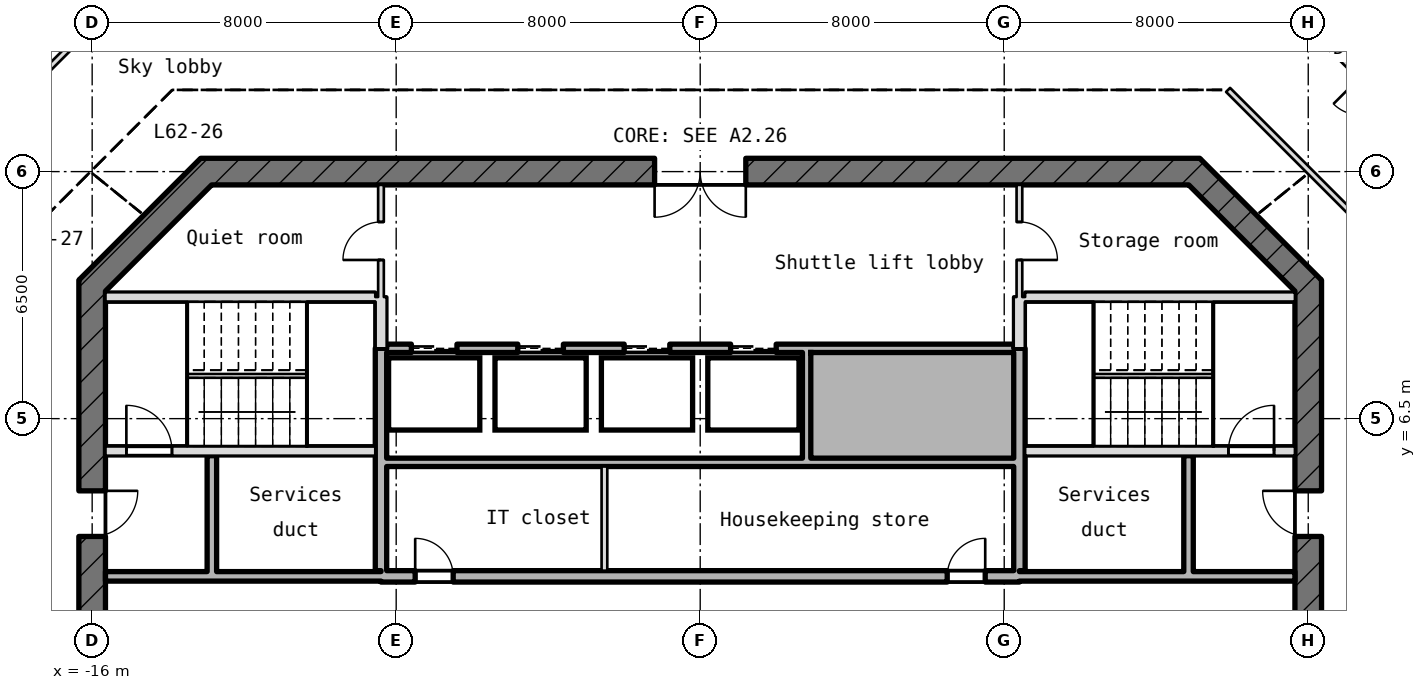
"""IFC4 building model, lengths in metres.
Left out: names, types, materials, properties, quantities, classifications, styles, units other than length and angle.
Written with IfcOpenShell. Run it as: python <this file> out.ifc"""

import sys

from ifc_helpers import new_model, si_unit, direction, frame, frame_2d, origin, place, context, subcontext, project, spatial, rectangle, extrude, element, fill, save


model = new_model("IFC4")
c1 = context("Model", 3, precision=1e-05, world=origin(), true_north=direction((0.0, 1.0)))
c2 = subcontext(c1, "Body", "Model", "MODEL_VIEW")
j1 = project(units=[si_unit("LENGTHUNIT", "METRE"), si_unit("PLANEANGLEUNIT", "RADIAN")], contexts=[c1])
p1 = place(None, origin())
s1 = spatial("IfcSite", under=j1, at=p1, CompositionType="ELEMENT")
p2 = place(p1, origin())
s2 = spatial("IfcBuilding", under=s1, at=p2, CompositionType="ELEMENT")
p3 = place(p2, frame((0.0, 0.0, 279.1)))
s3 = spatial("IfcBuildingStorey", under=s2, at=p3, CompositionType="ELEMENT", Elevation=279.1)
p4 = place(p3, frame((16.0, -10.145, -0.25), z_axis=(0.0, 0.0, 1.0), x_axis=(0.0, 1.0, 0.0)))
e1 = element("IfcWall", 1, at=p4, inside=s3, PredefinedType="SHEAR", context=c2, shape_type="SweptSolid", body=[
    extrude(rectangle(XDim=20.29, YDim=0.7, at=frame_2d((10.145, 0.0))), origin(), (0.0, 0.0, 1.0), 5.47),
])
p5 = place(p4, frame((8.945, 0.0, 0.25)))
e2 = element("IfcOpeningElement", 2, at=p5, cuts=e1, PredefinedType="OPENING", context=c2, shape_type="SweptSolid", body=[
    extrude(rectangle(XDim=2.4, YDim=2.1, at=frame_2d((1.2, 1.05))), frame((0.0, 0.36, 0.0), z_axis=(0.0, -1.0, 0.0), x_axis=(1.0, 0.0, 0.0)), (0.0, 0.0, 1.0), 0.72),
])
p6 = place(p4, frame((13.545, 0.0, 0.25)))
e3 = element("IfcOpeningElement", 3, at=p6, cuts=e1, PredefinedType="OPENING", context=c2, shape_type="SweptSolid", body=[
    extrude(rectangle(XDim=1.2, YDim=2.1, at=frame_2d((0.6, 1.05))), frame((0.0, 0.36, 0.0), z_axis=(0.0, -1.0, 0.0), x_axis=(1.0, 0.0, 0.0)), (0.0, 0.0, 1.0), 0.72),
])
p7 = place(p4, frame((4.745, 0.0, 0.25)))
e4 = element("IfcOpeningElement", 4, at=p7, cuts=e1, PredefinedType="OPENING", context=c2, shape_type="SweptSolid", body=[
    extrude(rectangle(XDim=1.2, YDim=2.1, at=frame_2d((0.6, 1.05))), frame((0.0, 0.36, 0.0), z_axis=(0.0, -1.0, 0.0), x_axis=(1.0, 0.0, 0.0)), (0.0, 0.0, 1.0), 0.72),
])
p8 = place(p3, frame((16.103, 9.897, -0.25), z_axis=(0.0, 0.0, 1.0), x_axis=(-0.707106781187, 0.707106781187, 0.0)))
e5 = element("IfcWall", 5, at=p8, inside=s3, PredefinedType="SHEAR", context=c2, shape_type="SweptSolid", body=[
    extrude(rectangle(XDim=4.533, YDim=0.7, at=frame_2d((2.266, 0.0))), origin(), (0.0, 0.0, 1.0), 5.47),
])
p9 = place(p3, frame((13.145, 13.0, -0.25), z_axis=(0.0, 0.0, 1.0), x_axis=(-1.0, 0.0, 0.0)))
e6 = element("IfcWall", 6, at=p9, inside=s3, PredefinedType="SHEAR", context=c2, shape_type="SweptSolid", body=[
    extrude(rectangle(XDim=26.29, YDim=0.7, at=frame_2d((13.145, 0.0))), origin(), (0.0, 0.0, 1.0), 5.47),
])
p10 = place(p9, frame((11.945, 0.0, 0.25)))
e7 = element("IfcOpeningElement", 7, at=p10, cuts=e6, PredefinedType="OPENING", context=c2, shape_type="SweptSolid", body=[
    extrude(rectangle(XDim=2.4, YDim=2.1, at=frame_2d((1.2, 1.05))), frame((0.0, 0.36, 0.0), z_axis=(0.0, -1.0, 0.0), x_axis=(1.0, 0.0, 0.0)), (0.0, 0.0, 1.0), 0.72),
])
p11 = place(p3, frame((-12.897, 13.103, -0.25), z_axis=(0.0, 0.0, 1.0), x_axis=(-0.707106781187, -0.707106781187, 0.0)))
e8 = element("IfcWall", 8, at=p11, inside=s3, PredefinedType="SHEAR", context=c2, shape_type="SweptSolid", body=[
    extrude(rectangle(XDim=4.533, YDim=0.7, at=frame_2d((2.266, 0.0))), origin(), (0.0, 0.0, 1.0), 5.47),
])
p12 = place(p3, frame((-16.0, 10.145, -0.25), z_axis=(0.0, 0.0, 1.0), x_axis=(0.0, -1.0, 0.0)))
e9 = element("IfcWall", 9, at=p12, inside=s3, PredefinedType="SHEAR", context=c2, shape_type="SweptSolid", body=[
    extrude(rectangle(XDim=20.29, YDim=0.7, at=frame_2d((10.145, 0.0))), origin(), (0.0, 0.0, 1.0), 5.47),
])
p13 = place(p12, frame((8.945, 0.0, 0.25)))
e10 = element("IfcOpeningElement", 10, at=p13, cuts=e9, PredefinedType="OPENING", context=c2, shape_type="SweptSolid", body=[
    extrude(rectangle(XDim=2.4, YDim=2.1, at=frame_2d((1.2, 1.05))), frame((0.0, 0.36, 0.0), z_axis=(0.0, -1.0, 0.0), x_axis=(1.0, 0.0, 0.0)), (0.0, 0.0, 1.0), 0.72),
])
p14 = place(p12, frame((5.545, 0.0, 0.25)))
e11 = element("IfcOpeningElement", 11, at=p14, cuts=e9, PredefinedType="OPENING", context=c2, shape_type="SweptSolid", body=[
    extrude(rectangle(XDim=1.2, YDim=2.1, at=frame_2d((0.6, 1.05))), frame((0.0, 0.36, 0.0), z_axis=(0.0, -1.0, 0.0), x_axis=(1.0, 0.0, 0.0)), (0.0, 0.0, 1.0), 0.72),
])
p15 = place(p3, frame((-15.65, 2.35, 0.0), z_axis=(0.0, 0.0, 1.0), x_axis=(1.0, 0.0, 0.0)))
e12 = element("IfcWall", 12, at=p15, inside=s3, PredefinedType="STANDARD", context=c2, shape_type="SweptSolid", body=[
    extrude(rectangle(XDim=7.25, YDim=0.25, at=frame_2d((3.625, 0.0))), origin(), (0.0, 0.0, 1.0), 5.22),
])
p16 = place(p3, frame((-8.4, 2.35, -0.25), z_axis=(0.0, 0.0, 1.0), x_axis=(1.0, 0.0, 0.0)))
e13 = element("IfcWall", 13, at=p16, inside=s3, PredefinedType="SHEAR", context=c2, shape_type="SweptSolid", body=[
    extrude(rectangle(XDim=16.8, YDim=0.3, at=frame_2d((8.4, 0.0))), origin(), (0.0, 0.0, 1.0), 5.47),
])
p17 = place(p16, frame((0.9, 0.0, 0.25)))
e14 = element("IfcOpeningElement", 14, at=p17, cuts=e13, PredefinedType="OPENING", context=c2, shape_type="SweptSolid", body=[
    extrude(rectangle(XDim=1.0, YDim=2.1, at=frame_2d((0.5, 1.05))), frame((0.0, 0.16, 0.0), z_axis=(0.0, -1.0, 0.0), x_axis=(1.0, 0.0, 0.0)), (0.0, 0.0, 1.0), 0.32),
])
p18 = place(p16, frame((14.9, 0.0, 0.25)))
e15 = element("IfcOpeningElement", 15, at=p18, cuts=e13, PredefinedType="OPENING", context=c2, shape_type="SweptSolid", body=[
    extrude(rectangle(XDim=1.0, YDim=2.1, at=frame_2d((0.5, 1.05))), frame((0.0, 0.16, 0.0), z_axis=(0.0, -1.0, 0.0), x_axis=(1.0, 0.0, 0.0)), (0.0, 0.0, 1.0), 0.32),
])
p19 = place(p3, frame((8.4, 2.35, 0.0), z_axis=(0.0, 0.0, 1.0), x_axis=(1.0, 0.0, 0.0)))
e16 = element("IfcWall", 16, at=p19, inside=s3, PredefinedType="STANDARD", context=c2, shape_type="SweptSolid", body=[
    extrude(rectangle(XDim=7.25, YDim=0.25, at=frame_2d((3.625, 0.0))), origin(), (0.0, 0.0, 1.0), 5.22),
])
p20 = place(p3, frame((-8.25, 5.35, 0.0), z_axis=(0.0, 0.0, 1.0), x_axis=(1.0, 0.0, 0.0)))
e17 = element("IfcWall", 17, at=p20, inside=s3, PredefinedType="STANDARD", context=c2, shape_type="SweptSolid", body=[
    extrude(rectangle(XDim=16.5, YDim=0.22, at=frame_2d((8.25, 0.0))), origin(), (0.0, 0.0, 1.0), 5.22),
])
p21 = place(p3, frame((-15.65, 5.65, -0.25), z_axis=(0.0, 0.0, 1.0), x_axis=(1.0, 0.0, 0.0)))
e18 = element("IfcWall", 18, at=p21, inside=s3, PredefinedType="SHEAR", context=c2, shape_type="SweptSolid", body=[
    extrude(rectangle(XDim=7.1, YDim=0.25, at=frame_2d((3.55, 0.0))), origin(), (0.0, 0.0, 1.0), 5.47),
])
p22 = place(p21, frame((0.55, 0.0, 0.25)))
e19 = element("IfcOpeningElement", 19, at=p22, cuts=e18, PredefinedType="OPENING", context=c2, shape_type="SweptSolid", body=[
    extrude(rectangle(XDim=1.2, YDim=2.1, at=frame_2d((0.6, 1.05))), frame((0.0, 0.135, 0.0), z_axis=(0.0, -1.0, 0.0), x_axis=(1.0, 0.0, 0.0)), (0.0, 0.0, 1.0), 0.27),
])
p23 = place(p3, frame((8.55, 5.65, -0.25), z_axis=(0.0, 0.0, 1.0), x_axis=(1.0, 0.0, 0.0)))
e20 = element("IfcWall", 20, at=p23, inside=s3, PredefinedType="SHEAR", context=c2, shape_type="SweptSolid", body=[
    extrude(rectangle(XDim=7.1, YDim=0.25, at=frame_2d((3.55, 0.0))), origin(), (0.0, 0.0, 1.0), 5.47),
])
p24 = place(p23, frame((5.35, 0.0, 0.25)))
e21 = element("IfcOpeningElement", 21, at=p24, cuts=e20, PredefinedType="OPENING", context=c2, shape_type="SweptSolid", body=[
    extrude(rectangle(XDim=1.2, YDim=2.1, at=frame_2d((0.6, 1.05))), frame((0.0, 0.135, 0.0), z_axis=(0.0, -1.0, 0.0), x_axis=(1.0, 0.0, 0.0)), (0.0, 0.0, 1.0), 0.27),
])
p25 = place(p3, frame((-8.25, 8.35, 0.0), z_axis=(0.0, 0.0, 1.0), x_axis=(1.0, 0.0, 0.0)))
e22 = element("IfcWall", 22, at=p25, inside=s3, PredefinedType="STANDARD", context=c2, shape_type="SweptSolid", body=[
    extrude(rectangle(XDim=16.5, YDim=0.22, at=frame_2d((8.25, 0.0))), origin(), (0.0, 0.0, 1.0), 5.22),
])
p26 = place(p25, frame((0.65, 0.0, 0.0)))
e23 = element("IfcOpeningElement", 23, at=p26, cuts=e22, PredefinedType="OPENING", context=c2, shape_type="SweptSolid", body=[
    extrude(rectangle(XDim=1.2, YDim=2.1, at=frame_2d((0.6, 1.05))), frame((0.0, 0.12, 0.0), z_axis=(0.0, -1.0, 0.0), x_axis=(1.0, 0.0, 0.0)), (0.0, 0.0, 1.0), 0.24),
])
p27 = place(p25, frame((3.45, 0.0, 0.0)))
e24 = element("IfcOpeningElement", 24, at=p27, cuts=e22, PredefinedType="OPENING", context=c2, shape_type="SweptSolid", body=[
    extrude(rectangle(XDim=1.2, YDim=2.1, at=frame_2d((0.6, 1.05))), frame((0.0, 0.12, 0.0), z_axis=(0.0, -1.0, 0.0), x_axis=(1.0, 0.0, 0.0)), (0.0, 0.0, 1.0), 0.24),
])
p28 = place(p25, frame((6.25, 0.0, 0.0)))
e25 = element("IfcOpeningElement", 25, at=p28, cuts=e22, PredefinedType="OPENING", context=c2, shape_type="SweptSolid", body=[
    extrude(rectangle(XDim=1.2, YDim=2.1, at=frame_2d((0.6, 1.05))), frame((0.0, 0.12, 0.0), z_axis=(0.0, -1.0, 0.0), x_axis=(1.0, 0.0, 0.0)), (0.0, 0.0, 1.0), 0.24),
])
p29 = place(p25, frame((9.05, 0.0, 0.0)))
e26 = element("IfcOpeningElement", 26, at=p29, cuts=e22, PredefinedType="OPENING", context=c2, shape_type="SweptSolid", body=[
    extrude(rectangle(XDim=1.2, YDim=2.1, at=frame_2d((0.6, 1.05))), frame((0.0, 0.12, 0.0), z_axis=(0.0, -1.0, 0.0), x_axis=(1.0, 0.0, 0.0)), (0.0, 0.0, 1.0), 0.24),
])
for number, where, z_axis, x_axis in (
    (27, (-15.65, 9.7, -0.25), (0.0, 0.0, 1.0), (1.0, 0.0, 0.0)),
    (28, (8.55, 9.7, -0.25), (0.0, 0.0, 1.0), (1.0, 0.0, 0.0)),
):
    element("IfcWall", number, at=place(p3, frame(where, z_axis=z_axis, x_axis=x_axis)), inside=s3, PredefinedType="SHEAR", context=c2, shape_type="SweptSolid", body=[
        extrude(rectangle(XDim=7.1, YDim=0.25, at=frame_2d((3.55, 0.0))), origin(), (0.0, 0.0, 1.0), 5.47),
    ])
p30 = place(p3, frame((-12.85, 2.475, 0.0), z_axis=(0.0, 0.0, 1.0), x_axis=(0.0, 1.0, 0.0)))
e29 = element("IfcWall", 29, at=p30, inside=s3, PredefinedType="STANDARD", context=c2, shape_type="SweptSolid", body=[
    extrude(rectangle(XDim=3.05, YDim=0.25, at=frame_2d((1.525, 0.0))), origin(), (0.0, 0.0, 1.0), 5.22),
])
p31 = place(p3, frame((-8.4, 2.5, -0.25), z_axis=(0.0, 0.0, 1.0), x_axis=(0.0, 1.0, 0.0)))
e30 = element("IfcWall", 30, at=p31, inside=s3, PredefinedType="SHEAR", context=c2, shape_type="SweptSolid", body=[
    extrude(rectangle(XDim=5.85, YDim=0.3, at=frame_2d((2.925, 0.0))), origin(), (0.0, 0.0, 1.0), 5.47),
])
p32 = place(p3, frame((-8.4, 8.35, -0.25), z_axis=(0.0, 0.0, 1.0), x_axis=(0.0, 1.0, 0.0)))
e31 = element("IfcWall", 31, at=p32, inside=s3, PredefinedType="SHEAR", context=c2, shape_type="SweptSolid", body=[
    extrude(rectangle(XDim=1.35, YDim=0.3, at=frame_2d((0.675, 0.0))), origin(), (0.0, 0.0, 1.0), 5.47),
])
p33 = place(p3, frame((-8.4, 9.7, 0.0), z_axis=(0.0, 0.0, 1.0), x_axis=(0.0, 1.0, 0.0)))
e32 = element("IfcWall", 32, at=p33, inside=s3, PredefinedType="PARTITIONING", context=c2, shape_type="SweptSolid", body=[
    extrude(rectangle(XDim=2.95, YDim=0.15, at=frame_2d((1.475, 0.0))), origin(), (0.0, 0.0, 1.0), 5.22),
])
p34 = place(p33, frame((0.975, 0.0, 0.0)))
e33 = element("IfcOpeningElement", 33, at=p34, cuts=e32, PredefinedType="OPENING", context=c2, shape_type="SweptSolid", body=[
    extrude(rectangle(XDim=1.0, YDim=2.1, at=frame_2d((0.5, 1.05))), frame((0.0, 0.085, 0.0), z_axis=(0.0, -1.0, 0.0), x_axis=(1.0, 0.0, 0.0)), (0.0, 0.0, 1.0), 0.17),
])
p35 = place(p3, frame((-2.52, 2.5, 0.0), z_axis=(0.0, 0.0, 1.0), x_axis=(0.0, 1.0, 0.0)))
e34 = element("IfcWall", 34, at=p35, inside=s3, PredefinedType="PARTITIONING", context=c2, shape_type="SweptSolid", body=[
    extrude(rectangle(XDim=2.74, YDim=0.15, at=frame_2d((1.37, 0.0))), origin(), (0.0, 0.0, 1.0), 5.22),
])
p36 = place(p3, frame((2.8, 5.46, 0.0), z_axis=(0.0, 0.0, 1.0), x_axis=(0.0, 1.0, 0.0)))
e35 = element("IfcWall", 35, at=p36, inside=s3, PredefinedType="STANDARD", context=c2, shape_type="SweptSolid", body=[
    extrude(rectangle(XDim=2.78, YDim=0.22, at=frame_2d((1.39, 0.0))), origin(), (0.0, 0.0, 1.0), 5.22),
])
p37 = place(p3, frame((8.4, 2.5, -0.25), z_axis=(0.0, 0.0, 1.0), x_axis=(0.0, 1.0, 0.0)))
e36 = element("IfcWall", 36, at=p37, inside=s3, PredefinedType="SHEAR", context=c2, shape_type="SweptSolid", body=[
    extrude(rectangle(XDim=5.85, YDim=0.3, at=frame_2d((2.925, 0.0))), origin(), (0.0, 0.0, 1.0), 5.47),
])
p38 = place(p3, frame((8.4, 8.35, -0.25), z_axis=(0.0, 0.0, 1.0), x_axis=(0.0, 1.0, 0.0)))
e37 = element("IfcWall", 37, at=p38, inside=s3, PredefinedType="SHEAR", context=c2, shape_type="SweptSolid", body=[
    extrude(rectangle(XDim=1.35, YDim=0.3, at=frame_2d((0.675, 0.0))), origin(), (0.0, 0.0, 1.0), 5.47),
])
p39 = place(p3, frame((8.4, 9.7, 0.0), z_axis=(0.0, 0.0, 1.0), x_axis=(0.0, 1.0, 0.0)))
e38 = element("IfcWall", 38, at=p39, inside=s3, PredefinedType="PARTITIONING", context=c2, shape_type="SweptSolid", body=[
    extrude(rectangle(XDim=2.95, YDim=0.15, at=frame_2d((1.475, 0.0))), origin(), (0.0, 0.0, 1.0), 5.22),
])
p40 = place(p39, frame((0.975, 0.0, 0.0)))
e39 = element("IfcOpeningElement", 39, at=p40, cuts=e38, PredefinedType="OPENING", context=c2, shape_type="SweptSolid", body=[
    extrude(rectangle(XDim=1.0, YDim=2.1, at=frame_2d((0.5, 1.05))), frame((0.0, 0.085, 0.0), z_axis=(0.0, -1.0, 0.0), x_axis=(1.0, 0.0, 0.0)), (0.0, 0.0, 1.0), 0.17),
])
p41 = place(p3, frame((12.85, 2.475, 0.0), z_axis=(0.0, 0.0, 1.0), x_axis=(0.0, 1.0, 0.0)))
e40 = element("IfcWall", 40, at=p41, inside=s3, PredefinedType="STANDARD", context=c2, shape_type="SweptSolid", body=[
    extrude(rectangle(XDim=3.05, YDim=0.25, at=frame_2d((1.525, 0.0))), origin(), (0.0, 0.0, 1.0), 5.22),
])
p42 = place(p3, frame((-20.659, 12.2, 0.0), z_axis=(0.0, 0.0, 1.0), x_axis=(0.707091504448, 0.707122057596, 0.0)))
e41 = element("IfcWall", 41, at=p42, inside=s3, PredefinedType="PARTITIONING", context=c2, shape_type="SweptSolid", body=[
    extrude(rectangle(XDim=7.991, YDim=0.15, at=frame_2d((3.995, 0.0))), origin(), (0.0, 0.0, 1.0), 5.22),
])
p43 = place(p42, frame((1.67, 0.0, 0.0)))
e42 = element("IfcOpeningElement", 42, at=p43, cuts=e41, PredefinedType="OPENING", context=c2, shape_type="SweptSolid", body=[
    extrude(rectangle(XDim=1.0, YDim=2.1, at=frame_2d((0.5, 1.05))), frame((0.0, 0.085, 0.0), z_axis=(0.0, -1.0, 0.0), x_axis=(1.0, 0.0, 0.0)), (0.0, 0.0, 1.0), 0.17),
])
p44 = place(p3, frame((20.439, 12.42, 0.0), z_axis=(0.0, 0.0, 1.0), x_axis=(-0.707106781187, 0.707106781187, 0.0)))
e43 = element("IfcWall", 43, at=p44, inside=s3, PredefinedType="PARTITIONING", context=c2, shape_type="SweptSolid", body=[
    extrude(rectangle(XDim=7.68, YDim=0.15, at=frame_2d((3.84, 0.0))), origin(), (0.0, 0.0, 1.0), 5.22),
])
p45 = place(p44, frame((3.34, 0.0, 0.0)))
e44 = element("IfcOpeningElement", 44, at=p45, cuts=e43, PredefinedType="OPENING", context=c2, shape_type="SweptSolid", body=[
    extrude(rectangle(XDim=1.0, YDim=2.1, at=frame_2d((0.5, 1.05))), frame((0.0, 0.085, 0.0), z_axis=(0.0, -1.0, 0.0), x_axis=(1.0, 0.0, 0.0)), (0.0, 0.0, 1.0), 0.17),
])
p46 = place(p3, frame((18.15, 10.891, 0.0), z_axis=(0.0, 0.0, 1.0), x_axis=(-0.707106781187, 0.707106781187, 0.0)))
e45 = element("IfcWall", 45, at=p46, inside=s3, PredefinedType="PARTITIONING", context=c2, shape_type="SweptSolid", body=[
    extrude(rectangle(XDim=6.023, YDim=0.15, at=frame_2d((3.012, 0.0))), origin(), (0.0, 0.0, 1.0), 5.22),
])
p47 = place(p26, origin())
e46 = element("IfcDoor", 46, at=p47, inside=s3, OperationType="DOUBLE_DOOR_SLIDING", PredefinedType="DOOR", context=c2, shape_type="SweptSolid", body=[
    extrude(rectangle(XDim=1.2, YDim=2.1, at=frame_2d((0.6, 1.05))), frame((0.0, 0.025, 0.0), z_axis=(0.0, -1.0, 0.0), x_axis=(1.0, 0.0, 0.0)), (0.0, 0.0, 1.0), 0.05),
])
fill(e23, e46)
p48 = place(p27, origin())
e47 = element("IfcDoor", 47, at=p48, inside=s3, OperationType="DOUBLE_DOOR_SLIDING", PredefinedType="DOOR", context=c2, shape_type="SweptSolid", body=[
    extrude(rectangle(XDim=1.2, YDim=2.1, at=frame_2d((0.6, 1.05))), frame((0.0, 0.025, 0.0), z_axis=(0.0, -1.0, 0.0), x_axis=(1.0, 0.0, 0.0)), (0.0, 0.0, 1.0), 0.05),
])
fill(e24, e47)
p49 = place(p28, origin())
e48 = element("IfcDoor", 48, at=p49, inside=s3, OperationType="DOUBLE_DOOR_SLIDING", PredefinedType="DOOR", context=c2, shape_type="SweptSolid", body=[
    extrude(rectangle(XDim=1.2, YDim=2.1, at=frame_2d((0.6, 1.05))), frame((0.0, 0.025, 0.0), z_axis=(0.0, -1.0, 0.0), x_axis=(1.0, 0.0, 0.0)), (0.0, 0.0, 1.0), 0.05),
])
fill(e25, e48)
p50 = place(p29, origin())
e49 = element("IfcDoor", 49, at=p50, inside=s3, OperationType="DOUBLE_DOOR_SLIDING", PredefinedType="DOOR", context=c2, shape_type="SweptSolid", body=[
    extrude(rectangle(XDim=1.2, YDim=2.1, at=frame_2d((0.6, 1.05))), frame((0.0, 0.025, 0.0), z_axis=(0.0, -1.0, 0.0), x_axis=(1.0, 0.0, 0.0)), (0.0, 0.0, 1.0), 0.05),
])
fill(e26, e49)
p51 = place(p22, origin())
e50 = element("IfcDoor", 50, at=p51, inside=s3, OperationType="SINGLE_SWING_RIGHT", PredefinedType="DOOR", context=c2, shape_type="SweptSolid", body=[
    extrude(rectangle(XDim=1.2, YDim=2.1, at=frame_2d((0.6, 1.05))), frame((0.0, 0.025, 0.0), z_axis=(0.0, -1.0, 0.0), x_axis=(1.0, 0.0, 0.0)), (0.0, 0.0, 1.0), 0.05),
])
fill(e19, e50)
p52 = place(p24, origin())
e51 = element("IfcDoor", 51, at=p52, inside=s3, OperationType="SINGLE_SWING_RIGHT", PredefinedType="DOOR", context=c2, shape_type="SweptSolid", body=[
    extrude(rectangle(XDim=1.2, YDim=2.1, at=frame_2d((0.6, 1.05))), frame((0.0, 0.025, 0.0), z_axis=(0.0, -1.0, 0.0), x_axis=(1.0, 0.0, 0.0)), (0.0, 0.0, 1.0), 0.05),
])
fill(e21, e51)
p53 = place(p14, origin())
e52 = element("IfcDoor", 52, at=p53, inside=s3, OperationType="SINGLE_SWING_RIGHT", PredefinedType="DOOR", context=c2, shape_type="SweptSolid", body=[
    extrude(rectangle(XDim=1.2, YDim=2.1, at=frame_2d((0.6, 1.05))), frame((0.0, 0.025, 0.0), z_axis=(0.0, -1.0, 0.0), x_axis=(1.0, 0.0, 0.0)), (0.0, 0.0, 1.0), 0.05),
])
fill(e11, e52)
p54 = place(p6, origin())
e53 = element("IfcDoor", 53, at=p54, inside=s3, OperationType="SINGLE_SWING_RIGHT", PredefinedType="DOOR", context=c2, shape_type="SweptSolid", body=[
    extrude(rectangle(XDim=1.2, YDim=2.1, at=frame_2d((0.6, 1.05))), frame((0.0, 0.025, 0.0), z_axis=(0.0, -1.0, 0.0), x_axis=(1.0, 0.0, 0.0)), (0.0, 0.0, 1.0), 0.05),
])
fill(e3, e53)
p55 = place(p10, origin())
e54 = element("IfcDoor", 54, at=p55, inside=s3, OperationType="DOUBLE_DOOR_SINGLE_SWING", PredefinedType="DOOR", context=c2, shape_type="SweptSolid", body=[
    extrude(rectangle(XDim=2.4, YDim=2.1, at=frame_2d((1.2, 1.05))), frame((0.0, 0.025, 0.0), z_axis=(0.0, -1.0, 0.0), x_axis=(1.0, 0.0, 0.0)), (0.0, 0.0, 1.0), 0.05),
])
fill(e7, e54)
p56 = place(p17, origin())
e55 = element("IfcDoor", 55, at=p56, inside=s3, OperationType="SINGLE_SWING_RIGHT", PredefinedType="DOOR", context=c2, shape_type="SweptSolid", body=[
    extrude(rectangle(XDim=1.0, YDim=2.1, at=frame_2d((0.5, 1.05))), frame((0.0, 0.025, 0.0), z_axis=(0.0, -1.0, 0.0), x_axis=(1.0, 0.0, 0.0)), (0.0, 0.0, 1.0), 0.05),
])
fill(e14, e55)
p57 = place(p18, origin())
e56 = element("IfcDoor", 56, at=p57, inside=s3, OperationType="SINGLE_SWING_RIGHT", PredefinedType="DOOR", context=c2, shape_type="SweptSolid", body=[
    extrude(rectangle(XDim=1.0, YDim=2.1, at=frame_2d((0.5, 1.05))), frame((0.0, 0.025, 0.0), z_axis=(0.0, -1.0, 0.0), x_axis=(1.0, 0.0, 0.0)), (0.0, 0.0, 1.0), 0.05),
])
fill(e15, e56)
p58 = place(p34, origin())
e57 = element("IfcDoor", 57, at=p58, inside=s3, OperationType="SINGLE_SWING_RIGHT", PredefinedType="DOOR", context=c2, shape_type="SweptSolid", body=[
    extrude(rectangle(XDim=1.0, YDim=2.1, at=frame_2d((0.5, 1.05))), frame((0.0, 0.025, 0.0), z_axis=(0.0, -1.0, 0.0), x_axis=(1.0, 0.0, 0.0)), (0.0, 0.0, 1.0), 0.05),
])
fill(e33, e57)
p59 = place(p40, frame((1.0, 0.0, 0.0), z_axis=(0.0, 0.0, 1.0), x_axis=(-1.0, 0.0, 0.0)))
e58 = element("IfcDoor", 58, at=p59, inside=s3, OperationType="SINGLE_SWING_LEFT", PredefinedType="DOOR", context=c2, shape_type="SweptSolid", body=[
    extrude(rectangle(XDim=1.0, YDim=2.1, at=frame_2d((0.5, 1.05))), frame((0.0, 0.025, 0.0), z_axis=(0.0, -1.0, 0.0), x_axis=(1.0, 0.0, 0.0)), (0.0, 0.0, 1.0), 0.05),
])
fill(e39, e58)
save(model, sys.argv[1])
